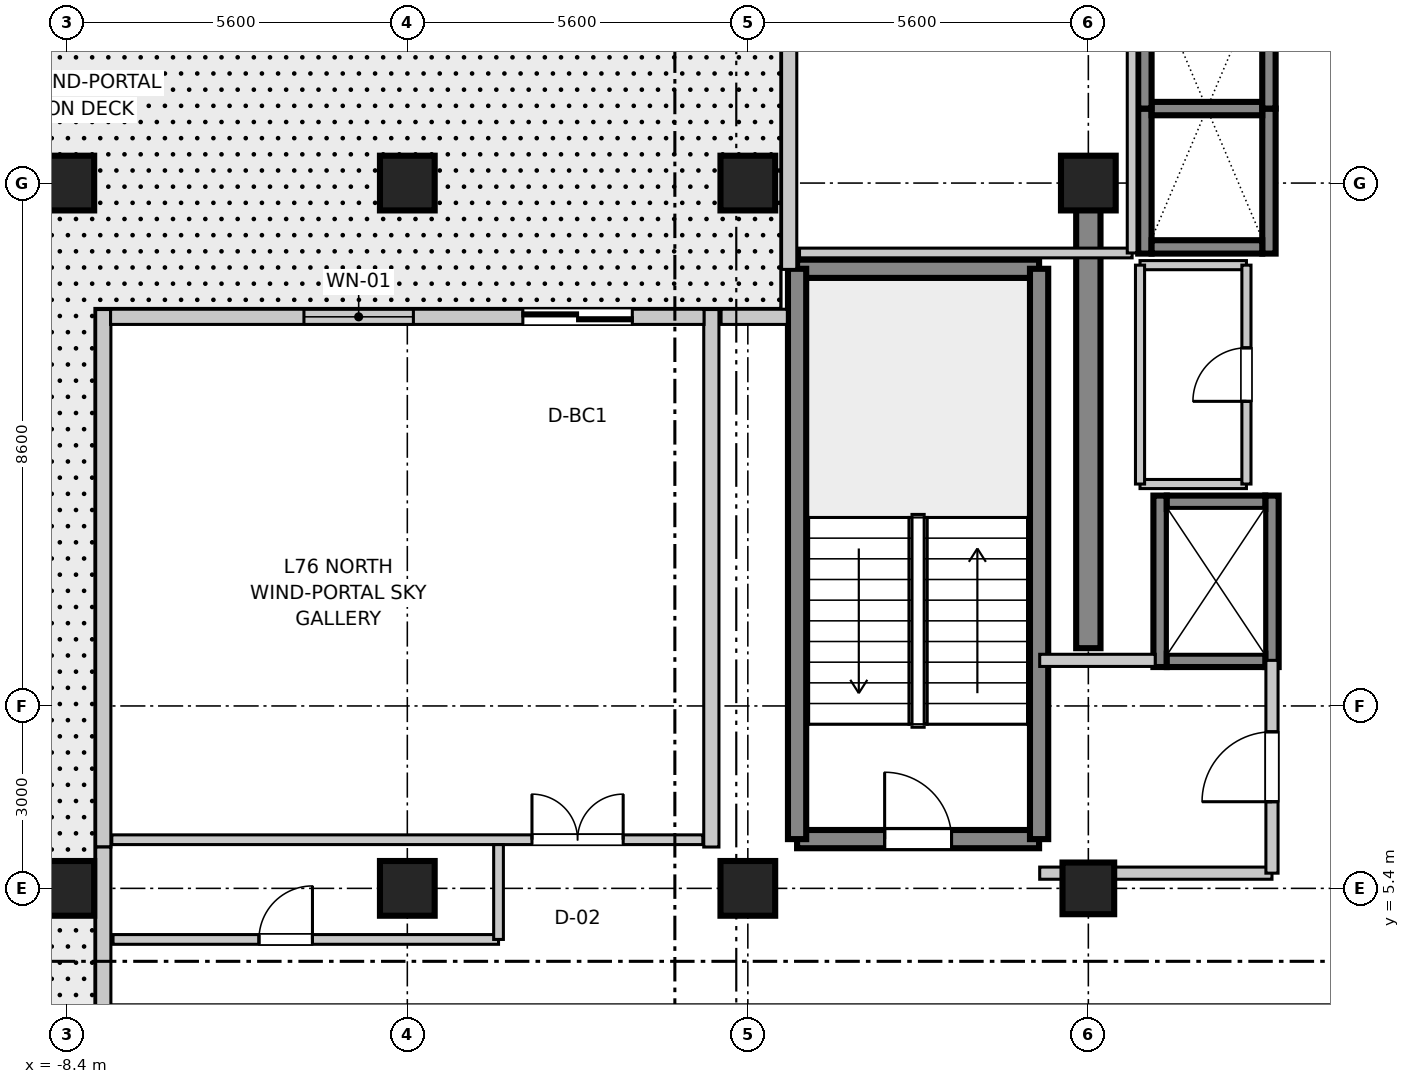
"""IFC4 building model, lengths in metres.
Left out: names, types, materials, properties, quantities, classifications, styles, units other than length and angle.
Written with IfcOpenShell. Run it as: python <this file> out.ifc"""

import sys

from ifc_helpers import new_model, si_unit, direction, frame, frame_2d, origin, origin_2d, place, context, subcontext, project, spatial, rectangle, extrude, source, transform, mapped, element, fill, save


model = new_model("IFC4")
c1 = context("Model", 3, precision=1e-05, world=origin(), true_north=direction((0.0, 1.0)))
c2 = subcontext(c1, "Body", "Model", "MODEL_VIEW")
j1 = project(units=[si_unit("LENGTHUNIT", "METRE"), si_unit("PLANEANGLEUNIT", "RADIAN")], contexts=[c1])
p1 = place(None, origin())
s1 = spatial("IfcSite", under=j1, at=p1, CompositionType="ELEMENT")
p2 = place(p1, origin())
s2 = spatial("IfcBuilding", under=s1, at=p2, CompositionType="ELEMENT")
p3 = place(p2, frame((0.0, 0.0, 296.5)))
s3 = spatial("IfcBuildingStorey", under=s2, at=p3, CompositionType="ELEMENT", Elevation=296.5)
m1 = source(origin(), c2, "Body", "SweptSolid", [
    extrude(rectangle(XDim=0.9, YDim=0.9, at=origin_2d()), origin(), (0.0, 0.0, 1.0), 3.805),
])
for number, where, z_axis, x_axis in (
    (1, (-8.4, 5.4, 0.0), (0.0, 0.0, 1.0), (1.0, 0.0, 0.0)),
    (2, (-8.4, 17.0, 0.0), (0.0, 0.0, 1.0), (1.0, 0.0, 0.0)),
    (3, (-2.8, 5.4, 0.0), (0.0, 0.0, 1.0), (1.0, 0.0, 0.0)),
    (4, (-2.8, 17.0, 0.0), (0.0, 0.0, 1.0), (1.0, 0.0, 0.0)),
    (5, (2.8, 5.4, 0.0), (0.0, 0.0, 1.0), (1.0, 0.0, 0.0)),
    (6, (2.8, 17.0, 0.0), (0.0, 0.0, 1.0), (1.0, 0.0, 0.0)),
):
    element("IfcColumn", number, at=place(p3, frame(where, z_axis=z_axis, x_axis=x_axis)), inside=s3, PredefinedType="COLUMN", context=c2, shape_type="MappedRepresentation", body=[
        mapped(m1, transform((0.0, 0.0, 0.0), scale=1.0)),
    ])
m2 = source(origin(), c2, "Body", "SweptSolid", [
    extrude(rectangle(XDim=0.85, YDim=0.85, at=origin_2d()), origin(), (0.0, 0.0, 1.0), 3.805),
])
p4 = place(p3, frame((8.4, 5.4, 0.0), z_axis=(0.0, 0.0, 1.0), x_axis=(1.0, 0.0, 0.0)))
e7 = element("IfcColumn", 7, at=p4, inside=s3, PredefinedType="PILASTER", context=c2, shape_type="MappedRepresentation", body=[
    mapped(m2, transform((0.0, 0.0, 0.0), scale=1.0)),
])
p5 = place(p3, frame((8.4, 17.0, 0.0), z_axis=(0.0, 0.0, 1.0), x_axis=(1.0, 0.0, 0.0)))
e8 = element("IfcColumn", 8, at=p5, inside=s3, PredefinedType="COLUMN", context=c2, shape_type="MappedRepresentation", body=[
    mapped(m1, transform((0.0, 0.0, 0.0), scale=1.0)),
])
m3 = source(origin(), c2, "Body", "SweptSolid", [
    extrude(rectangle(XDim=7.65, YDim=0.4, at=frame_2d((3.825, 0.0))), origin(), (0.0, 0.0, 1.0), 3.55),
])
p6 = place(p3, frame((8.4, 9.35, 0.0), z_axis=(0.0, 0.0, 1.0), x_axis=(0.0, 1.0, 0.0)))
e9 = element("IfcWall", 9, at=p6, inside=s3, PredefinedType="SHEAR", context=c2, shape_type="MappedRepresentation", body=[
    mapped(m3, transform((0.0, 0.0, 0.0), scale=1.0)),
])
m4 = source(origin(), c2, "Body", "SweptSolid", [
    extrude(rectangle(XDim=3.98, YDim=0.3, at=frame_2d((1.99, 0.0))), origin(), (0.0, 0.0, 1.0), 3.55),
])
p7 = place(p3, frame((3.61, 6.21, 0.0), z_axis=(0.0, 0.0, 1.0), x_axis=(1.0, 0.0, 0.0)))
e10 = element("IfcWall", 10, at=p7, inside=s3, PredefinedType="SHEAR", context=c2, shape_type="MappedRepresentation", body=[
    mapped(m4, transform((0.0, 0.0, 0.0), scale=1.0)),
])
p8 = place(p7, frame((1.44, 0.0, 0.0)))
e11 = element("IfcOpeningElement", 11, at=p8, cuts=e10, PredefinedType="OPENING", context=c2, shape_type="SweptSolid", body=[
    extrude(rectangle(XDim=1.1, YDim=2.15, at=frame_2d((0.55, 1.075))), frame((0.0, 0.16, 0.0), z_axis=(0.0, -1.0, 0.0), x_axis=(1.0, 0.0, 0.0)), (0.0, 0.0, 1.0), 0.32),
])
p9 = place(p3, frame((3.61, 15.59, 0.0), z_axis=(0.0, 0.0, 1.0), x_axis=(1.0, 0.0, 0.0)))
e12 = element("IfcWall", 12, at=p9, inside=s3, PredefinedType="SHEAR", context=c2, shape_type="MappedRepresentation", body=[
    mapped(m4, transform((0.0, 0.0, 0.0), scale=1.0)),
])
m5 = source(origin(), c2, "Body", "SweptSolid", [
    extrude(rectangle(XDim=9.38, YDim=0.3, at=frame_2d((4.69, 0.0))), origin(), (0.0, 0.0, 1.0), 3.55),
])
for number, where, z_axis, x_axis in (
    (13, (3.61, 6.21, 0.0), (0.0, 0.0, 1.0), (0.0, 1.0, 0.0)),
    (14, (7.59, 6.21, 0.0), (0.0, 0.0, 1.0), (0.0, 1.0, 0.0)),
):
    element("IfcWall", number, at=place(p3, frame(where, z_axis=z_axis, x_axis=x_axis)), inside=s3, PredefinedType="SHEAR", context=c2, shape_type="MappedRepresentation", body=[
        mapped(m5, transform((0.0, 0.0, 0.0), scale=1.0)),
    ])
m6 = source(origin(), c2, "Body", "SweptSolid", [
    extrude(rectangle(XDim=2.385, YDim=0.22, at=frame_2d((1.192, 0.0))), origin(), (0.0, 0.0, 1.0), 3.55),
])
for number, where, z_axis, x_axis in (
    (15, (9.33, 15.84, 0.0), (0.0, 0.0, 1.0), (0.0, 1.0, 0.0)),
    (16, (11.37, 15.84, 0.0), (0.0, 0.0, 1.0), (0.0, 1.0, 0.0)),
):
    element("IfcWall", number, at=place(p3, frame(where, z_axis=z_axis, x_axis=x_axis)), inside=s3, PredefinedType="SHEAR", context=c2, shape_type="MappedRepresentation", body=[
        mapped(m6, transform((0.0, 0.0, 0.0), scale=1.0)),
    ])
m7 = source(origin(), c2, "Body", "SweptSolid", [
    extrude(rectangle(XDim=1.82, YDim=0.22, at=frame_2d((0.91, 0.0))), origin(), (0.0, 0.0, 1.0), 3.55),
])
p10 = place(p3, frame((9.44, 15.95, 0.0), z_axis=(0.0, 0.0, 1.0), x_axis=(1.0, 0.0, 0.0)))
e17 = element("IfcWall", 17, at=p10, inside=s3, PredefinedType="SHEAR", context=c2, shape_type="MappedRepresentation", body=[
    mapped(m7, transform((0.0, 0.0, 0.0), scale=1.0)),
])
m8 = source(origin(), c2, "Body", "SweptSolid", [
    extrude(rectangle(XDim=1.82, YDim=0.22, at=frame_2d((0.91, 0.0))), origin(), (0.0, 0.0, 1.0), 3.85),
])
p11 = place(p3, frame((9.44, 18.225, 0.0), z_axis=(0.0, 0.0, 1.0), x_axis=(1.0, 0.0, 0.0)))
e18 = element("IfcWall", 18, at=p11, inside=s3, PredefinedType="SHEAR", context=c2, shape_type="MappedRepresentation", body=[
    mapped(m8, transform((0.0, 0.0, 0.0), scale=1.0)),
])
for number, where, z_axis, x_axis in (
    (19, (9.33, 18.225, 0.0), (0.0, 0.0, 1.0), (0.0, 1.0, 0.0)),
    (20, (11.37, 18.225, 0.0), (0.0, 0.0, 1.0), (0.0, 1.0, 0.0)),
):
    element("IfcWall", number, at=place(p3, frame(where, z_axis=z_axis, x_axis=x_axis)), inside=s3, PredefinedType="SHEAR", context=c2, shape_type="MappedRepresentation", body=[
        mapped(m6, transform((0.0, 0.0, 0.0), scale=1.0)),
    ])
m9 = source(origin(), c2, "Body", "SweptSolid", [
    extrude(rectangle(XDim=2.82, YDim=0.22, at=frame_2d((1.41, 0.0))), origin(), (0.0, 0.0, 1.0), 3.55),
])
for number, where, z_axis, x_axis in (
    (21, (9.58, 9.04, 0.0), (0.0, 0.0, 1.0), (0.0, 1.0, 0.0)),
    (22, (11.42, 9.04, 0.0), (0.0, 0.0, 1.0), (0.0, 1.0, 0.0)),
):
    element("IfcWall", number, at=place(p3, frame(where, z_axis=z_axis, x_axis=x_axis)), inside=s3, PredefinedType="SHEAR", context=c2, shape_type="MappedRepresentation", body=[
        mapped(m9, transform((0.0, 0.0, 0.0), scale=1.0)),
    ])
m10 = source(origin(), c2, "Body", "SweptSolid", [
    extrude(rectangle(XDim=1.62, YDim=0.22, at=frame_2d((0.81, 0.0))), origin(), (0.0, 0.0, 1.0), 3.55),
])
for number, where, z_axis, x_axis in (
    (23, (9.69, 9.15, 0.0), (0.0, 0.0, 1.0), (1.0, 0.0, 0.0)),
    (24, (9.69, 11.75, 0.0), (0.0, 0.0, 1.0), (1.0, 0.0, 0.0)),
):
    element("IfcWall", number, at=place(p3, frame(where, z_axis=z_axis, x_axis=x_axis)), inside=s3, PredefinedType="SHEAR", context=c2, shape_type="MappedRepresentation", body=[
        mapped(m10, transform((0.0, 0.0, 0.0), scale=1.0)),
    ])
m11 = source(origin(), c2, "Body", "SweptSolid", [
    extrude(rectangle(XDim=8.84, YDim=0.25, at=frame_2d((4.42, 0.0))), origin(), (0.0, 0.0, 1.0), 2.99),
])
for number, where, z_axis, x_axis in (
    (25, (-7.8, 6.08, 0.0), (0.0, 0.0, 1.0), (0.0, 1.0, 0.0)),
    (26, (2.2, 6.08, 0.0), (0.0, 0.0, 1.0), (0.0, 1.0, 0.0)),
):
    element("IfcWall", number, at=place(p3, frame(where, z_axis=z_axis, x_axis=x_axis)), inside=s3, PredefinedType="STANDARD", context=c2, shape_type="MappedRepresentation", body=[
        mapped(m11, transform((0.0, 0.0, 0.0), scale=1.0)),
    ])
m12 = source(origin(), c2, "Body", "SweptSolid", [
    extrude(rectangle(XDim=9.76, YDim=0.25, at=frame_2d((4.88, 0.0))), origin(), (0.0, 0.0, 1.0), 2.99),
])
p12 = place(p3, frame((-7.68, 14.8, 0.0), z_axis=(0.0, 0.0, 1.0), x_axis=(1.0, 0.0, 0.0)))
e27 = element("IfcWall", 27, at=p12, inside=s3, PredefinedType="STANDARD", context=c2, shape_type="MappedRepresentation", body=[
    mapped(m12, transform((0.0, 0.0, 0.0), scale=1.0)),
])
p13 = place(p12, frame((6.78, 0.0, 0.0)))
e28 = element("IfcOpeningElement", 28, at=p13, cuts=e27, PredefinedType="OPENING", context=c2, shape_type="SweptSolid", body=[
    extrude(rectangle(XDim=1.8, YDim=2.25, at=frame_2d((0.9, 1.125))), frame((0.0, 0.135, 0.0), z_axis=(0.0, -1.0, 0.0), x_axis=(1.0, 0.0, 0.0)), (0.0, 0.0, 1.0), 0.27),
])
p14 = place(p12, frame((3.18, 0.0, 0.85)))
e29 = element("IfcOpeningElement", 29, at=p14, cuts=e27, PredefinedType="OPENING", context=c2, shape_type="SweptSolid", body=[
    extrude(rectangle(XDim=1.8, YDim=1.5, at=frame_2d((0.9, 0.75))), frame((0.0, 0.135, 0.0), z_axis=(0.0, -1.0, 0.0), x_axis=(1.0, 0.0, 0.0)), (0.0, 0.0, 1.0), 0.27),
])
m13 = source(origin(), c2, "Body", "SweptSolid", [
    extrude(rectangle(XDim=3.82, YDim=0.2, at=frame_2d((1.91, 0.0))), origin(), (0.0, 0.0, 1.0), 2.89),
])
p15 = place(p3, frame((7.6, 5.65, 0.0), z_axis=(0.0, 0.0, 1.0), x_axis=(1.0, 0.0, 0.0)))
e30 = element("IfcWall", 30, at=p15, inside=s3, PredefinedType="PARTITIONING", context=c2, shape_type="MappedRepresentation", body=[
    mapped(m13, transform((0.0, 0.0, 0.0), scale=1.0)),
])
m14 = source(origin(), c2, "Body", "SweptSolid", [
    extrude(rectangle(XDim=1.9, YDim=0.2, at=frame_2d((0.95, 0.0))), origin(), (0.0, 0.0, 1.0), 2.89),
])
p16 = place(p3, frame((7.6, 9.15, 0.0), z_axis=(0.0, 0.0, 1.0), x_axis=(1.0, 0.0, 0.0)))
e31 = element("IfcWall", 31, at=p16, inside=s3, PredefinedType="PARTITIONING", context=c2, shape_type="MappedRepresentation", body=[
    mapped(m14, transform((0.0, 0.0, 0.0), scale=1.0)),
])
m15 = source(origin(), c2, "Body", "SweptSolid", [
    extrude(rectangle(XDim=3.5, YDim=0.2, at=frame_2d((1.75, 0.0))), origin(), (0.0, 0.0, 1.0), 2.89),
])
p17 = place(p3, frame((11.42, 5.65, 0.0), z_axis=(0.0, 0.0, 1.0), x_axis=(0.0, 1.0, 0.0)))
e32 = element("IfcWall", 32, at=p17, inside=s3, PredefinedType="PARTITIONING", context=c2, shape_type="MappedRepresentation", body=[
    mapped(m15, transform((0.0, 0.0, 0.0), scale=1.0)),
])
p18 = place(p17, frame((1.175, 0.0, 0.0)))
e33 = element("IfcOpeningElement", 33, at=p18, cuts=e32, PredefinedType="OPENING", context=c2, shape_type="SweptSolid", body=[
    extrude(rectangle(XDim=1.15, YDim=2.15, at=frame_2d((0.575, 1.075))), frame((0.0, 0.11, 0.0), z_axis=(0.0, -1.0, 0.0), x_axis=(1.0, 0.0, 0.0)), (0.0, 0.0, 1.0), 0.22),
])
m16 = source(origin(), c2, "Body", "SweptSolid", [
    extrude(rectangle(XDim=1.75, YDim=0.15, at=frame_2d((0.875, 0.0))), origin(), (0.0, 0.0, 1.0), 2.89),
])
for number, where, z_axis, x_axis in (
    (34, (9.25, 12.05, 0.0), (0.0, 0.0, 1.0), (1.0, 0.0, 0.0)),
    (35, (9.25, 15.65, 0.0), (0.0, 0.0, 1.0), (1.0, 0.0, 0.0)),
):
    element("IfcWall", number, at=place(p3, frame(where, z_axis=z_axis, x_axis=x_axis)), inside=s3, PredefinedType="PARTITIONING", context=c2, shape_type="MappedRepresentation", body=[
        mapped(m16, transform((0.0, 0.0, 0.0), scale=1.0)),
    ])
m17 = source(origin(), c2, "Body", "SweptSolid", [
    extrude(rectangle(XDim=3.6, YDim=0.15, at=frame_2d((1.8, 0.0))), origin(), (0.0, 0.0, 1.0), 2.89),
])
p19 = place(p3, frame((9.25, 12.05, 0.0), z_axis=(0.0, 0.0, 1.0), x_axis=(0.0, 1.0, 0.0)))
e36 = element("IfcWall", 36, at=p19, inside=s3, PredefinedType="PARTITIONING", context=c2, shape_type="MappedRepresentation", body=[
    mapped(m17, transform((0.0, 0.0, 0.0), scale=1.0)),
])
p20 = place(p3, frame((11.0, 12.05, 0.0), z_axis=(0.0, 0.0, 1.0), x_axis=(0.0, 1.0, 0.0)))
e37 = element("IfcWall", 37, at=p20, inside=s3, PredefinedType="PARTITIONING", context=c2, shape_type="MappedRepresentation", body=[
    mapped(m17, transform((0.0, 0.0, 0.0), scale=1.0)),
])
p21 = place(p20, frame((1.36, 0.0, 0.0)))
e38 = element("IfcOpeningElement", 38, at=p21, cuts=e37, PredefinedType="OPENING", context=c2, shape_type="SweptSolid", body=[
    extrude(rectangle(XDim=0.88, YDim=2.1, at=frame_2d((0.44, 1.05))), frame((0.0, 0.085, 0.0), z_axis=(0.0, -1.0, 0.0), x_axis=(1.0, 0.0, 0.0)), (0.0, 0.0, 1.0), 0.17),
])
m18 = source(origin(), c2, "Body", "SweptSolid", [
    extrude(rectangle(XDim=2.72, YDim=0.25, at=frame_2d((1.36, 0.0))), origin(), (0.0, 0.0, 1.0), 2.89),
])
p22 = place(p3, frame((-7.8, 3.36, 0.0), z_axis=(0.0, 0.0, 1.0), x_axis=(0.0, 1.0, 0.0)))
e39 = element("IfcWall", 39, at=p22, inside=s3, PredefinedType="STANDARD", context=c2, shape_type="MappedRepresentation", body=[
    mapped(m18, transform((0.0, 0.0, 0.0), scale=1.0)),
])
m19 = source(origin(), c2, "Body", "SweptSolid", [
    extrude(rectangle(XDim=1.09, YDim=0.25, at=frame_2d((0.545, 0.0))), origin(), (0.0, 0.0, 1.0), 2.89),
])
p23 = place(p3, frame((2.36, 14.8, 0.0), z_axis=(0.0, 0.0, 1.0), x_axis=(1.0, 0.0, 0.0)))
e40 = element("IfcWall", 40, at=p23, inside=s3, PredefinedType="STANDARD", context=c2, shape_type="MappedRepresentation", body=[
    mapped(m19, transform((0.0, 0.0, 0.0), scale=1.0)),
])
m20 = source(origin(), c2, "Body", "SweptSolid", [
    extrude(rectangle(XDim=6.86, YDim=0.25, at=frame_2d((3.43, 0.0))), origin(), (0.0, 0.0, 1.0), 2.89),
])
p24 = place(p3, frame((3.48, 15.58, 0.0), z_axis=(0.0, 0.0, 1.0), x_axis=(0.0, 1.0, 0.0)))
e41 = element("IfcWall", 41, at=p24, inside=s3, PredefinedType="STANDARD", context=c2, shape_type="MappedRepresentation", body=[
    mapped(m20, transform((0.0, 0.0, 0.0), scale=1.0)),
])
m21 = source(origin(), c2, "Body", "SweptSolid", [
    extrude(rectangle(XDim=9.72, YDim=0.16, at=frame_2d((4.86, 0.0))), origin(), (0.0, 0.0, 1.0), 2.89),
])
p25 = place(p3, frame((-7.66, 6.2, 0.0), z_axis=(0.0, 0.0, 1.0), x_axis=(1.0, 0.0, 0.0)))
e42 = element("IfcWall", 42, at=p25, inside=s3, PredefinedType="PARTITIONING", context=c2, shape_type="MappedRepresentation", body=[
    mapped(m21, transform((0.0, 0.0, 0.0), scale=1.0)),
])
p26 = place(p25, frame((6.91, 0.0, 0.0)))
e43 = element("IfcOpeningElement", 43, at=p26, cuts=e42, PredefinedType="OPENING", context=c2, shape_type="SweptSolid", body=[
    extrude(rectangle(XDim=1.5, YDim=2.15, at=frame_2d((0.75, 1.075))), frame((0.0, 0.09, 0.0), z_axis=(0.0, -1.0, 0.0), x_axis=(1.0, 0.0, 0.0)), (0.0, 0.0, 1.0), 0.18),
])
m22 = source(origin(), c2, "Body", "SweptSolid", [
    extrude(rectangle(XDim=6.34, YDim=0.16, at=frame_2d((3.17, 0.0))), origin(), (0.0, 0.0, 1.0), 2.89),
])
p27 = place(p3, frame((-7.64, 4.56, 0.0), z_axis=(0.0, 0.0, 1.0), x_axis=(1.0, 0.0, 0.0)))
e44 = element("IfcWall", 44, at=p27, inside=s3, PredefinedType="PARTITIONING", context=c2, shape_type="MappedRepresentation", body=[
    mapped(m22, transform((0.0, 0.0, 0.0), scale=1.0)),
])
p28 = place(p27, frame((2.4, 0.0, 0.0)))
e45 = element("IfcOpeningElement", 45, at=p28, cuts=e44, PredefinedType="OPENING", context=c2, shape_type="SweptSolid", body=[
    extrude(rectangle(XDim=0.88, YDim=2.1, at=frame_2d((0.44, 1.05))), frame((0.0, 0.09, 0.0), z_axis=(0.0, -1.0, 0.0), x_axis=(1.0, 0.0, 0.0)), (0.0, 0.0, 1.0), 0.18),
])
m23 = source(origin(), c2, "Body", "SweptSolid", [
    extrude(rectangle(XDim=1.56, YDim=0.16, at=frame_2d((0.78, 0.0))), origin(), (0.0, 0.0, 1.0), 2.89),
])
p29 = place(p3, frame((-1.3, 4.56, 0.0), z_axis=(0.0, 0.0, 1.0), x_axis=(0.0, 1.0, 0.0)))
e46 = element("IfcWall", 46, at=p29, inside=s3, PredefinedType="PARTITIONING", context=c2, shape_type="MappedRepresentation", body=[
    mapped(m23, transform((0.0, 0.0, 0.0), scale=1.0)),
])
m24 = source(origin(), c2, "Body", "SweptSolid", [
    extrude(rectangle(XDim=5.47, YDim=0.16, at=frame_2d((2.735, 0.0))), origin(), (0.0, 0.0, 1.0), 2.89),
])
p30 = place(p3, frame((3.65, 15.85, 0.0), z_axis=(0.0, 0.0, 1.0), x_axis=(1.0, 0.0, 0.0)))
e47 = element("IfcWall", 47, at=p30, inside=s3, PredefinedType="PARTITIONING", context=c2, shape_type="MappedRepresentation", body=[
    mapped(m24, transform((0.0, 0.0, 0.0), scale=1.0)),
])
m25 = source(origin(), c2, "Body", "SweptSolid", [
    extrude(rectangle(XDim=6.45, YDim=0.16, at=frame_2d((3.225, 0.0))), origin(), (0.0, 0.0, 1.0), 2.89),
])
p31 = place(p3, frame((9.12, 15.85, 0.0), z_axis=(0.0, 0.0, 1.0), x_axis=(0.0, 1.0, 0.0)))
e48 = element("IfcWall", 48, at=p31, inside=s3, PredefinedType="PARTITIONING", context=c2, shape_type="MappedRepresentation", body=[
    mapped(m25, transform((0.0, 0.0, 0.0), scale=1.0)),
])
p32 = place(p31, frame((5.16, 0.0, 0.0)))
e49 = element("IfcOpeningElement", 49, at=p32, cuts=e48, PredefinedType="OPENING", context=c2, shape_type="SweptSolid", body=[
    extrude(rectangle(XDim=0.88, YDim=2.1, at=frame_2d((0.44, 1.05))), frame((0.0, 0.09, 0.0), z_axis=(0.0, -1.0, 0.0), x_axis=(1.0, 0.0, 0.0)), (0.0, 0.0, 1.0), 0.18),
])
m26 = source(origin(), c2, "Body", "SweptSolid", [
    extrude(rectangle(XDim=1.1, YDim=2.15, at=frame_2d((0.55, 1.075))), frame((0.0, 0.025, 0.0), z_axis=(0.0, -1.0, 0.0), x_axis=(1.0, 0.0, 0.0)), (0.0, 0.0, 1.0), 0.05),
])
p33 = place(p8, origin())
e50 = element("IfcDoor", 50, at=p33, inside=s3, OperationType="SINGLE_SWING_LEFT", PredefinedType="DOOR", context=c2, shape_type="MappedRepresentation", body=[
    mapped(m26, transform((0.0, 0.0, 0.0), scale=1.0)),
])
fill(e11, e50)
m27 = source(origin(), c2, "Body", "SweptSolid", [
    extrude(rectangle(XDim=1.8, YDim=2.25, at=frame_2d((0.9, 1.125))), frame((0.0, 0.025, 0.0), z_axis=(0.0, -1.0, 0.0), x_axis=(1.0, 0.0, 0.0)), (0.0, 0.0, 1.0), 0.05),
])
p34 = place(p13, origin())
e51 = element("IfcDoor", 51, at=p34, inside=s3, OperationType="DOUBLE_DOOR_SLIDING", PredefinedType="DOOR", context=c2, shape_type="MappedRepresentation", body=[
    mapped(m27, transform((0.0, 0.0, 0.0), scale=1.0)),
])
fill(e28, e51)
m28 = source(origin(), c2, "Body", "SweptSolid", [
    extrude(rectangle(XDim=1.8, YDim=1.5, at=frame_2d((0.9, 0.75))), frame((0.0, 0.03, 0.0), z_axis=(0.0, -1.0, 0.0), x_axis=(1.0, 0.0, 0.0)), (0.0, 0.0, 1.0), 0.06),
])
p35 = place(p14, origin())
e52 = element("IfcWindow", 52, at=p35, inside=s3, PartitioningType="SINGLE_PANEL", PredefinedType="WINDOW", context=c2, shape_type="MappedRepresentation", body=[
    mapped(m28, transform((0.0, 0.0, 0.0), scale=1.0)),
])
fill(e29, e52)
m29 = source(origin(), c2, "Body", "SweptSolid", [
    extrude(rectangle(XDim=1.15, YDim=2.15, at=frame_2d((0.575, 1.075))), frame((0.0, 0.025, 0.0), z_axis=(0.0, -1.0, 0.0), x_axis=(1.0, 0.0, 0.0)), (0.0, 0.0, 1.0), 0.05),
])
p36 = place(p18, frame((1.15, 0.0, 0.0), z_axis=(0.0, 0.0, 1.0), x_axis=(-1.0, 0.0, 0.0)))
e53 = element("IfcDoor", 53, at=p36, inside=s3, OperationType="SINGLE_SWING_LEFT", PredefinedType="DOOR", context=c2, shape_type="MappedRepresentation", body=[
    mapped(m29, transform((0.0, 0.0, 0.0), scale=1.0)),
])
fill(e33, e53)
m30 = source(origin(), c2, "Body", "SweptSolid", [
    extrude(rectangle(XDim=0.88, YDim=2.1, at=frame_2d((0.44, 1.05))), frame((0.0, 0.025, 0.0), z_axis=(0.0, -1.0, 0.0), x_axis=(1.0, 0.0, 0.0)), (0.0, 0.0, 1.0), 0.05),
])
p37 = place(p21, origin())
e54 = element("IfcDoor", 54, at=p37, inside=s3, OperationType="SINGLE_SWING_LEFT", PredefinedType="DOOR", context=c2, shape_type="MappedRepresentation", body=[
    mapped(m30, transform((0.0, 0.0, 0.0), scale=1.0)),
])
fill(e38, e54)
m31 = source(origin(), c2, "Body", "SweptSolid", [
    extrude(rectangle(XDim=1.5, YDim=2.15, at=frame_2d((0.75, 1.075))), frame((0.0, 0.025, 0.0), z_axis=(0.0, -1.0, 0.0), x_axis=(1.0, 0.0, 0.0)), (0.0, 0.0, 1.0), 0.05),
])
p38 = place(p26, origin())
e55 = element("IfcDoor", 55, at=p38, inside=s3, OperationType="DOUBLE_DOOR_SINGLE_SWING", PredefinedType="DOOR", context=c2, shape_type="MappedRepresentation", body=[
    mapped(m31, transform((0.0, 0.0, 0.0), scale=1.0)),
])
fill(e43, e55)
p39 = place(p28, origin())
e56 = element("IfcDoor", 56, at=p39, inside=s3, OperationType="SINGLE_SWING_RIGHT", PredefinedType="DOOR", context=c2, shape_type="MappedRepresentation", body=[
    mapped(m30, transform((0.0, 0.0, 0.0), scale=1.0)),
])
fill(e45, e56)
save(model, sys.argv[1])
